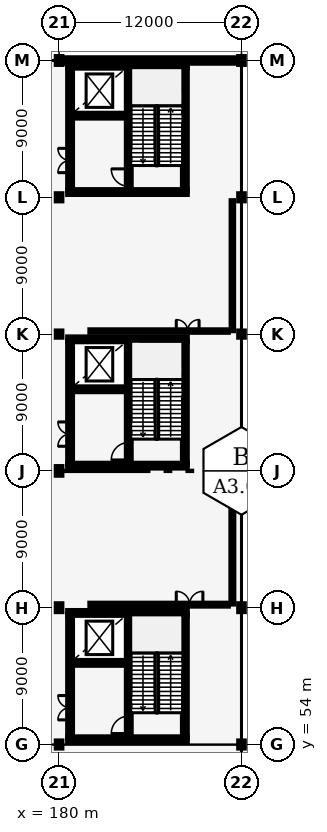
"""IFC4 building model, lengths in metres.
Left out: names, types, materials, properties, quantities, classifications, styles, units other than length and angle.
Written with IfcOpenShell. Run it as: python <this file> out.ifc"""

import sys

from ifc_helpers import new_model, si_unit, direction, frame, frame_2d, origin, origin_2d, place, context, subcontext, project, spatial, rectangle, i_section, extrude, element, fill, save


model = new_model("IFC4")
c1 = context("Model", 3, precision=1e-05, world=origin(), true_north=direction((0.0, 1.0)))
c2 = subcontext(c1, "Body", "Model", "MODEL_VIEW")
j1 = project(units=[si_unit("LENGTHUNIT", "METRE"), si_unit("PLANEANGLEUNIT", "RADIAN")], contexts=[c1])
p1 = place(None, origin())
s1 = spatial("IfcSite", under=j1, at=p1, CompositionType="ELEMENT")
p2 = place(p1, origin())
s2 = spatial("IfcBuilding", under=s1, at=p2, CompositionType="ELEMENT")
p3 = place(p2, frame((0.0, 0.0, 18.0)))
s3 = spatial("IfcBuildingStorey", under=s2, at=p3, CompositionType="ELEMENT", Elevation=18.0)
p4 = place(p3, frame((180.0, 54.0, 0.0), z_axis=(0.0, 0.0, 1.0), x_axis=(1.0, 0.0, 0.0)))
e1 = element("IfcColumn", 1, at=p4, inside=s3, PredefinedType="COLUMN", context=c2, shape_type="SweptSolid", body=[
    extrude(i_section(OverallWidth=0.3, OverallDepth=0.4, WebThickness=0.013, FlangeThickness=0.024, FilletRadius=0.027, at=origin_2d()), origin(), (0.0, 0.0, 1.0), 4.8),
])
p5 = place(p3, frame((180.0, 63.0, 0.0), z_axis=(0.0, 0.0, 1.0), x_axis=(1.0, 0.0, 0.0)))
e2 = element("IfcColumn", 2, at=p5, inside=s3, PredefinedType="COLUMN", context=c2, shape_type="SweptSolid", body=[
    extrude(i_section(OverallWidth=0.3, OverallDepth=0.45, WebThickness=0.014, FlangeThickness=0.026, FilletRadius=0.027, at=origin_2d()), origin(), (0.0, 0.0, 1.0), 4.8),
])
p6 = place(p3, frame((180.0, 72.0, 0.0), z_axis=(0.0, 0.0, 1.0), x_axis=(1.0, 0.0, 0.0)))
e3 = element("IfcColumn", 3, at=p6, inside=s3, PredefinedType="COLUMN", context=c2, shape_type="SweptSolid", body=[
    extrude(i_section(OverallWidth=0.3, OverallDepth=0.5, WebThickness=0.014, FlangeThickness=0.028, FilletRadius=0.027, at=origin_2d()), origin(), (0.0, 0.0, 1.0), 4.8),
])
p7 = place(p3, frame((180.0, 81.0, 0.0), z_axis=(0.0, 0.0, 1.0), x_axis=(1.0, 0.0, 0.0)))
e4 = element("IfcColumn", 4, at=p7, inside=s3, PredefinedType="COLUMN", context=c2, shape_type="SweptSolid", body=[
    extrude(i_section(OverallWidth=0.3, OverallDepth=0.34, WebThickness=0.012, FlangeThickness=0.021, FilletRadius=0.027, at=origin_2d()), origin(), (0.0, 0.0, 1.0), 4.8),
])
p8 = place(p3, frame((180.0, 90.0, 0.0), z_axis=(0.0, 0.0, 1.0), x_axis=(1.0, 0.0, 0.0)))
e5 = element("IfcColumn", 5, at=p8, inside=s3, PredefinedType="COLUMN", context=c2, shape_type="SweptSolid", body=[
    extrude(i_section(OverallWidth=0.3, OverallDepth=0.4, WebThickness=0.013, FlangeThickness=0.024, FilletRadius=0.027, at=origin_2d()), origin(), (0.0, 0.0, 1.0), 4.8),
])
p9 = place(p3, frame((180.0, 99.0, 0.0), z_axis=(0.0, 0.0, 1.0), x_axis=(1.0, 0.0, 0.0)))
e6 = element("IfcColumn", 6, at=p9, inside=s3, PredefinedType="COLUMN", context=c2, shape_type="SweptSolid", body=[
    extrude(i_section(OverallWidth=0.3, OverallDepth=0.45, WebThickness=0.014, FlangeThickness=0.026, FilletRadius=0.027, at=origin_2d()), origin(), (0.0, 0.0, 1.0), 4.8),
])
p10 = place(p3, frame((192.0, 54.0, 0.0), z_axis=(0.0, 0.0, 1.0), x_axis=(1.0, 0.0, 0.0)))
e7 = element("IfcColumn", 7, at=p10, inside=s3, PredefinedType="COLUMN", context=c2, shape_type="SweptSolid", body=[
    extrude(i_section(OverallWidth=0.3, OverallDepth=0.4, WebThickness=0.013, FlangeThickness=0.024, FilletRadius=0.027, at=origin_2d()), origin(), (0.0, 0.0, 1.0), 4.8),
])
p11 = place(p3, frame((192.0, 63.0, 0.0), z_axis=(0.0, 0.0, 1.0), x_axis=(1.0, 0.0, 0.0)))
e8 = element("IfcColumn", 8, at=p11, inside=s3, PredefinedType="COLUMN", context=c2, shape_type="SweptSolid", body=[
    extrude(i_section(OverallWidth=0.3, OverallDepth=0.45, WebThickness=0.014, FlangeThickness=0.026, FilletRadius=0.027, at=origin_2d()), origin(), (0.0, 0.0, 1.0), 4.8),
])
p12 = place(p3, frame((192.0, 72.0, 0.0), z_axis=(0.0, 0.0, 1.0), x_axis=(1.0, 0.0, 0.0)))
e9 = element("IfcColumn", 9, at=p12, inside=s3, PredefinedType="COLUMN", context=c2, shape_type="SweptSolid", body=[
    extrude(i_section(OverallWidth=0.3, OverallDepth=0.5, WebThickness=0.014, FlangeThickness=0.028, FilletRadius=0.027, at=origin_2d()), origin(), (0.0, 0.0, 1.0), 4.8),
])
p13 = place(p3, frame((192.0, 81.0, 0.0), z_axis=(0.0, 0.0, 1.0), x_axis=(1.0, 0.0, 0.0)))
e10 = element("IfcColumn", 10, at=p13, inside=s3, PredefinedType="COLUMN", context=c2, shape_type="SweptSolid", body=[
    extrude(i_section(OverallWidth=0.3, OverallDepth=0.34, WebThickness=0.012, FlangeThickness=0.021, FilletRadius=0.027, at=origin_2d()), origin(), (0.0, 0.0, 1.0), 4.8),
])
p14 = place(p3, frame((192.0, 90.0, 0.0), z_axis=(0.0, 0.0, 1.0), x_axis=(1.0, 0.0, 0.0)))
e11 = element("IfcColumn", 11, at=p14, inside=s3, PredefinedType="COLUMN", context=c2, shape_type="SweptSolid", body=[
    extrude(i_section(OverallWidth=0.3, OverallDepth=0.4, WebThickness=0.013, FlangeThickness=0.024, FilletRadius=0.027, at=origin_2d()), origin(), (0.0, 0.0, 1.0), 4.8),
])
p15 = place(p3, frame((192.0, 99.0, 0.0), z_axis=(0.0, 0.0, 1.0), x_axis=(1.0, 0.0, 0.0)))
e12 = element("IfcColumn", 12, at=p15, inside=s3, PredefinedType="COLUMN", context=c2, shape_type="SweptSolid", body=[
    extrude(i_section(OverallWidth=0.3, OverallDepth=0.45, WebThickness=0.014, FlangeThickness=0.026, FilletRadius=0.027, at=origin_2d()), origin(), (0.0, 0.0, 1.0), 4.8),
])
p16 = place(p3, frame((180.145, 99.0, 0.0), z_axis=(0.0, 0.0, 1.0), x_axis=(1.0, 0.0, 0.0)))
e13 = element("IfcWall", 13, at=p16, inside=s3, PredefinedType="SOLIDWALL", context=c2, shape_type="SweptSolid", body=[
    extrude(rectangle(XDim=11.71, YDim=0.29, at=frame_2d((5.855, 0.0))), origin(), (0.0, 0.0, 1.0), 3.65),
])
p17 = place(p3, frame((180.725, 54.47, 0.0), z_axis=(0.0, 0.0, 1.0), x_axis=(0.0, 1.0, 0.0)))
e14 = element("IfcWall", 14, at=p17, inside=s3, PredefinedType="SHEAR", context=c2, shape_type="SweptSolid", body=[
    extrude(rectangle(XDim=8.06, YDim=0.25, at=frame_2d((4.03, 0.0))), origin(), (0.0, 0.0, 1.0), 4.44),
])
p18 = place(p17, frame((1.15, 0.0, 0.0)))
e15 = element("IfcOpeningElement", 15, at=p18, cuts=e14, PredefinedType="OPENING", context=c2, shape_type="SweptSolid", body=[
    extrude(rectangle(XDim=1.6, YDim=2.2, at=frame_2d((0.8, 1.1))), frame((0.0, 0.135, 0.0), z_axis=(0.0, -1.0, 0.0), x_axis=(1.0, 0.0, 0.0)), (0.0, 0.0, 1.0), 0.27),
])
p19 = place(p3, frame((188.275, 54.47, 0.0), z_axis=(0.0, 0.0, 1.0), x_axis=(0.0, 1.0, 0.0)))
e16 = element("IfcWall", 16, at=p19, inside=s3, PredefinedType="SHEAR", context=c2, shape_type="SweptSolid", body=[
    extrude(rectangle(XDim=8.06, YDim=0.25, at=frame_2d((4.03, 0.0))), origin(), (0.0, 0.0, 1.0), 4.44),
])
for number, where, z_axis, x_axis in (
    (17, (180.6, 54.345, 0.0), (0.0, 0.0, 1.0), (1.0, 0.0, 0.0)),
    (18, (180.6, 62.655, 0.0), (0.0, 0.0, 1.0), (1.0, 0.0, 0.0)),
):
    element("IfcWall", number, at=place(p3, frame(where, z_axis=z_axis, x_axis=x_axis)), inside=s3, PredefinedType="SHEAR", context=c2, shape_type="SweptSolid", body=[
        extrude(rectangle(XDim=7.8, YDim=0.25, at=frame_2d((3.9, 0.0))), origin(), (0.0, 0.0, 1.0), 4.44),
    ])
p20 = place(p3, frame((184.585, 54.47, 0.0), z_axis=(0.0, 0.0, 1.0), x_axis=(0.0, 1.0, 0.0)))
e19 = element("IfcWall", 19, at=p20, inside=s3, PredefinedType="SHEAR", context=c2, shape_type="SweptSolid", body=[
    extrude(rectangle(XDim=8.06, YDim=0.25, at=frame_2d((4.03, 0.0))), origin(), (0.0, 0.0, 1.0), 4.44),
])
p21 = place(p20, frame((0.25, 0.0, 0.0)))
e20 = element("IfcOpeningElement", 20, at=p21, cuts=e19, PredefinedType="OPENING", context=c2, shape_type="SweptSolid", body=[
    extrude(rectangle(XDim=1.15, YDim=2.15, at=frame_2d((0.575, 1.075))), frame((0.0, 0.135, 0.0), z_axis=(0.0, -1.0, 0.0), x_axis=(1.0, 0.0, 0.0)), (0.0, 0.0, 1.0), 0.27),
])
p22 = place(p3, frame((180.85, 59.37, 0.0), z_axis=(0.0, 0.0, 1.0), x_axis=(1.0, 0.0, 0.0)))
e21 = element("IfcWall", 21, at=p22, inside=s3, PredefinedType="SHEAR", context=c2, shape_type="SweptSolid", body=[
    extrude(rectangle(XDim=3.61, YDim=0.25, at=frame_2d((1.805, 0.0))), origin(), (0.0, 0.0, 1.0), 4.44),
])
p23 = place(p22, frame((0.95, 0.0, 0.0)))
e22 = element("IfcOpeningElement", 22, at=p23, cuts=e21, PredefinedType="OPENING", context=c2, shape_type="SweptSolid", body=[
    extrude(rectangle(XDim=1.2, YDim=2.2, at=frame_2d((0.6, 1.1))), frame((0.0, 0.135, 0.0), z_axis=(0.0, -1.0, 0.0), x_axis=(1.0, 0.0, 0.0)), (0.0, 0.0, 1.0), 0.27),
])
p24 = place(p3, frame((180.725, 72.47, 0.0), z_axis=(0.0, 0.0, 1.0), x_axis=(0.0, 1.0, 0.0)))
e23 = element("IfcWall", 23, at=p24, inside=s3, PredefinedType="SHEAR", context=c2, shape_type="SweptSolid", body=[
    extrude(rectangle(XDim=8.06, YDim=0.25, at=frame_2d((4.03, 0.0))), origin(), (0.0, 0.0, 1.0), 4.44),
])
p25 = place(p24, frame((1.15, 0.0, 0.0)))
e24 = element("IfcOpeningElement", 24, at=p25, cuts=e23, PredefinedType="OPENING", context=c2, shape_type="SweptSolid", body=[
    extrude(rectangle(XDim=1.6, YDim=2.2, at=frame_2d((0.8, 1.1))), frame((0.0, 0.135, 0.0), z_axis=(0.0, -1.0, 0.0), x_axis=(1.0, 0.0, 0.0)), (0.0, 0.0, 1.0), 0.27),
])
p26 = place(p3, frame((188.275, 72.47, 0.0), z_axis=(0.0, 0.0, 1.0), x_axis=(0.0, 1.0, 0.0)))
e25 = element("IfcWall", 25, at=p26, inside=s3, PredefinedType="SHEAR", context=c2, shape_type="SweptSolid", body=[
    extrude(rectangle(XDim=8.06, YDim=0.25, at=frame_2d((4.03, 0.0))), origin(), (0.0, 0.0, 1.0), 4.44),
])
for number, where, z_axis, x_axis in (
    (26, (180.6, 72.345, 0.0), (0.0, 0.0, 1.0), (1.0, 0.0, 0.0)),
    (27, (180.6, 80.655, 0.0), (0.0, 0.0, 1.0), (1.0, 0.0, 0.0)),
):
    element("IfcWall", number, at=place(p3, frame(where, z_axis=z_axis, x_axis=x_axis)), inside=s3, PredefinedType="SHEAR", context=c2, shape_type="SweptSolid", body=[
        extrude(rectangle(XDim=7.8, YDim=0.25, at=frame_2d((3.9, 0.0))), origin(), (0.0, 0.0, 1.0), 4.44),
    ])
p27 = place(p3, frame((184.585, 72.47, 0.0), z_axis=(0.0, 0.0, 1.0), x_axis=(0.0, 1.0, 0.0)))
e28 = element("IfcWall", 28, at=p27, inside=s3, PredefinedType="SHEAR", context=c2, shape_type="SweptSolid", body=[
    extrude(rectangle(XDim=8.06, YDim=0.25, at=frame_2d((4.03, 0.0))), origin(), (0.0, 0.0, 1.0), 4.44),
])
p28 = place(p27, frame((0.25, 0.0, 0.0)))
e29 = element("IfcOpeningElement", 29, at=p28, cuts=e28, PredefinedType="OPENING", context=c2, shape_type="SweptSolid", body=[
    extrude(rectangle(XDim=1.15, YDim=2.15, at=frame_2d((0.575, 1.075))), frame((0.0, 0.135, 0.0), z_axis=(0.0, -1.0, 0.0), x_axis=(1.0, 0.0, 0.0)), (0.0, 0.0, 1.0), 0.27),
])
p29 = place(p3, frame((180.85, 77.37, 0.0), z_axis=(0.0, 0.0, 1.0), x_axis=(1.0, 0.0, 0.0)))
e30 = element("IfcWall", 30, at=p29, inside=s3, PredefinedType="SHEAR", context=c2, shape_type="SweptSolid", body=[
    extrude(rectangle(XDim=3.61, YDim=0.25, at=frame_2d((1.805, 0.0))), origin(), (0.0, 0.0, 1.0), 4.44),
])
p30 = place(p29, frame((0.95, 0.0, 0.0)))
e31 = element("IfcOpeningElement", 31, at=p30, cuts=e30, PredefinedType="OPENING", context=c2, shape_type="SweptSolid", body=[
    extrude(rectangle(XDim=1.2, YDim=2.2, at=frame_2d((0.6, 1.1))), frame((0.0, 0.135, 0.0), z_axis=(0.0, -1.0, 0.0), x_axis=(1.0, 0.0, 0.0)), (0.0, 0.0, 1.0), 0.27),
])
p31 = place(p3, frame((180.725, 90.47, 0.0), z_axis=(0.0, 0.0, 1.0), x_axis=(0.0, 1.0, 0.0)))
e32 = element("IfcWall", 32, at=p31, inside=s3, PredefinedType="SHEAR", context=c2, shape_type="SweptSolid", body=[
    extrude(rectangle(XDim=8.06, YDim=0.25, at=frame_2d((4.03, 0.0))), origin(), (0.0, 0.0, 1.0), 4.44),
])
p32 = place(p31, frame((1.15, 0.0, 0.0)))
e33 = element("IfcOpeningElement", 33, at=p32, cuts=e32, PredefinedType="OPENING", context=c2, shape_type="SweptSolid", body=[
    extrude(rectangle(XDim=1.6, YDim=2.2, at=frame_2d((0.8, 1.1))), frame((0.0, 0.135, 0.0), z_axis=(0.0, -1.0, 0.0), x_axis=(1.0, 0.0, 0.0)), (0.0, 0.0, 1.0), 0.27),
])
p33 = place(p3, frame((188.275, 90.47, 0.0), z_axis=(0.0, 0.0, 1.0), x_axis=(0.0, 1.0, 0.0)))
e34 = element("IfcWall", 34, at=p33, inside=s3, PredefinedType="SHEAR", context=c2, shape_type="SweptSolid", body=[
    extrude(rectangle(XDim=8.06, YDim=0.25, at=frame_2d((4.03, 0.0))), origin(), (0.0, 0.0, 1.0), 4.44),
])
for number, where, z_axis, x_axis in (
    (35, (180.6, 90.345, 0.0), (0.0, 0.0, 1.0), (1.0, 0.0, 0.0)),
    (36, (180.6, 98.655, 0.0), (0.0, 0.0, 1.0), (1.0, 0.0, 0.0)),
):
    element("IfcWall", number, at=place(p3, frame(where, z_axis=z_axis, x_axis=x_axis)), inside=s3, PredefinedType="SHEAR", context=c2, shape_type="SweptSolid", body=[
        extrude(rectangle(XDim=7.8, YDim=0.25, at=frame_2d((3.9, 0.0))), origin(), (0.0, 0.0, 1.0), 4.44),
    ])
p34 = place(p3, frame((184.585, 90.47, 0.0), z_axis=(0.0, 0.0, 1.0), x_axis=(0.0, 1.0, 0.0)))
e37 = element("IfcWall", 37, at=p34, inside=s3, PredefinedType="SHEAR", context=c2, shape_type="SweptSolid", body=[
    extrude(rectangle(XDim=8.06, YDim=0.25, at=frame_2d((4.03, 0.0))), origin(), (0.0, 0.0, 1.0), 4.44),
])
p35 = place(p34, frame((0.25, 0.0, 0.0)))
e38 = element("IfcOpeningElement", 38, at=p35, cuts=e37, PredefinedType="OPENING", context=c2, shape_type="SweptSolid", body=[
    extrude(rectangle(XDim=1.15, YDim=2.15, at=frame_2d((0.575, 1.075))), frame((0.0, 0.135, 0.0), z_axis=(0.0, -1.0, 0.0), x_axis=(1.0, 0.0, 0.0)), (0.0, 0.0, 1.0), 0.27),
])
p36 = place(p3, frame((180.85, 95.37, 0.0), z_axis=(0.0, 0.0, 1.0), x_axis=(1.0, 0.0, 0.0)))
e39 = element("IfcWall", 39, at=p36, inside=s3, PredefinedType="SHEAR", context=c2, shape_type="SweptSolid", body=[
    extrude(rectangle(XDim=3.61, YDim=0.25, at=frame_2d((1.805, 0.0))), origin(), (0.0, 0.0, 1.0), 4.44),
])
p37 = place(p36, frame((0.95, 0.0, 0.0)))
e40 = element("IfcOpeningElement", 40, at=p37, cuts=e39, PredefinedType="OPENING", context=c2, shape_type="SweptSolid", body=[
    extrude(rectangle(XDim=1.2, YDim=2.2, at=frame_2d((0.6, 1.1))), frame((0.0, 0.135, 0.0), z_axis=(0.0, -1.0, 0.0), x_axis=(1.0, 0.0, 0.0)), (0.0, 0.0, 1.0), 0.27),
])
p38 = place(p3, frame((182.06, 63.2, 0.0), z_axis=(0.0, 0.0, 1.0), x_axis=(1.0, 0.0, 0.0)))
e41 = element("IfcWall", 41, at=p38, inside=s3, PredefinedType="PARTITIONING", context=c2, shape_type="SweptSolid", body=[
    extrude(rectangle(XDim=9.04, YDim=0.125, at=frame_2d((4.52, 0.0))), origin(), (0.0, 0.0, 1.0), 3.6),
])
p39 = place(p38, frame((5.65, 0.0, 0.0)))
e42 = element("IfcOpeningElement", 42, at=p39, cuts=e41, PredefinedType="OPENING", context=c2, shape_type="SweptSolid", body=[
    extrude(rectangle(XDim=1.75, YDim=2.3, at=frame_2d((0.875, 1.15))), frame((0.0, 0.073, 0.0), z_axis=(0.0, -1.0, 0.0), x_axis=(1.0, 0.0, 0.0)), (0.0, 0.0, 1.0), 0.145),
])
p40 = place(p3, frame((191.4, 63.275, 0.0), z_axis=(0.0, 0.0, 1.0), x_axis=(0.0, 1.0, 0.0)))
e43 = element("IfcWall", 43, at=p40, inside=s3, PredefinedType="PARTITIONING", context=c2, shape_type="SweptSolid", body=[
    extrude(rectangle(XDim=8.45, YDim=0.125, at=frame_2d((4.225, 0.0))), origin(), (0.0, 0.0, 1.0), 3.6),
])
p41 = place(p3, frame((182.06, 81.2, 0.0), z_axis=(0.0, 0.0, 1.0), x_axis=(1.0, 0.0, 0.0)))
e44 = element("IfcWall", 44, at=p41, inside=s3, PredefinedType="PARTITIONING", context=c2, shape_type="SweptSolid", body=[
    extrude(rectangle(XDim=9.04, YDim=0.095, at=frame_2d((4.52, 0.0))), origin(), (0.0, 0.0, 1.0), 3.6),
])
p42 = place(p41, frame((5.65, 0.0, 0.0)))
e45 = element("IfcOpeningElement", 45, at=p42, cuts=e44, PredefinedType="OPENING", context=c2, shape_type="SweptSolid", body=[
    extrude(rectangle(XDim=1.5, YDim=2.25, at=frame_2d((0.75, 1.125))), frame((0.0, 0.057, 0.0), z_axis=(0.0, -1.0, 0.0), x_axis=(1.0, 0.0, 0.0)), (0.0, 0.0, 1.0), 0.115),
])
p43 = place(p3, frame((191.4, 81.257, 0.0), z_axis=(0.0, 0.0, 1.0), x_axis=(0.0, 1.0, 0.0)))
e46 = element("IfcWall", 46, at=p43, inside=s3, PredefinedType="PARTITIONING", context=c2, shape_type="SweptSolid", body=[
    extrude(rectangle(XDim=8.486, YDim=0.095, at=frame_2d((4.243, 0.0))), origin(), (0.0, 0.0, 1.0), 3.6),
])
p44 = place(p21, origin())
e47 = element("IfcDoor", 47, at=p44, inside=s3, OperationType="SINGLE_SWING_LEFT", PredefinedType="DOOR", context=c2, shape_type="SweptSolid", body=[
    extrude(rectangle(XDim=1.15, YDim=2.15, at=frame_2d((0.575, 1.075))), frame((0.0, 0.025, 0.0), z_axis=(0.0, -1.0, 0.0), x_axis=(1.0, 0.0, 0.0)), (0.0, 0.0, 1.0), 0.05),
])
fill(e20, e47)
p45 = place(p23, origin())
e48 = element("IfcDoor", 48, at=p45, inside=s3, OperationType="DOUBLE_DOOR_SLIDING", PredefinedType="DOOR", context=c2, shape_type="SweptSolid", body=[
    extrude(rectangle(XDim=1.2, YDim=2.2, at=frame_2d((0.6, 1.1))), frame((0.0, 0.025, 0.0), z_axis=(0.0, -1.0, 0.0), x_axis=(1.0, 0.0, 0.0)), (0.0, 0.0, 1.0), 0.05),
])
fill(e22, e48)
p46 = place(p18, origin())
e49 = element("IfcDoor", 49, at=p46, inside=s3, OperationType="DOUBLE_DOOR_SINGLE_SWING", PredefinedType="DOOR", context=c2, shape_type="SweptSolid", body=[
    extrude(rectangle(XDim=1.6, YDim=2.2, at=frame_2d((0.8, 1.1))), frame((0.0, 0.025, 0.0), z_axis=(0.0, -1.0, 0.0), x_axis=(1.0, 0.0, 0.0)), (0.0, 0.0, 1.0), 0.05),
])
fill(e15, e49)
p47 = place(p28, origin())
e50 = element("IfcDoor", 50, at=p47, inside=s3, OperationType="SINGLE_SWING_LEFT", PredefinedType="DOOR", context=c2, shape_type="SweptSolid", body=[
    extrude(rectangle(XDim=1.15, YDim=2.15, at=frame_2d((0.575, 1.075))), frame((0.0, 0.025, 0.0), z_axis=(0.0, -1.0, 0.0), x_axis=(1.0, 0.0, 0.0)), (0.0, 0.0, 1.0), 0.05),
])
fill(e29, e50)
p48 = place(p30, origin())
e51 = element("IfcDoor", 51, at=p48, inside=s3, OperationType="DOUBLE_DOOR_SLIDING", PredefinedType="DOOR", context=c2, shape_type="SweptSolid", body=[
    extrude(rectangle(XDim=1.2, YDim=2.2, at=frame_2d((0.6, 1.1))), frame((0.0, 0.025, 0.0), z_axis=(0.0, -1.0, 0.0), x_axis=(1.0, 0.0, 0.0)), (0.0, 0.0, 1.0), 0.05),
])
fill(e31, e51)
p49 = place(p25, origin())
e52 = element("IfcDoor", 52, at=p49, inside=s3, OperationType="DOUBLE_DOOR_SINGLE_SWING", PredefinedType="DOOR", context=c2, shape_type="SweptSolid", body=[
    extrude(rectangle(XDim=1.6, YDim=2.2, at=frame_2d((0.8, 1.1))), frame((0.0, 0.025, 0.0), z_axis=(0.0, -1.0, 0.0), x_axis=(1.0, 0.0, 0.0)), (0.0, 0.0, 1.0), 0.05),
])
fill(e24, e52)
p50 = place(p35, origin())
e53 = element("IfcDoor", 53, at=p50, inside=s3, OperationType="SINGLE_SWING_RIGHT", PredefinedType="DOOR", context=c2, shape_type="SweptSolid", body=[
    extrude(rectangle(XDim=1.15, YDim=2.15, at=frame_2d((0.575, 1.075))), frame((0.0, 0.025, 0.0), z_axis=(0.0, -1.0, 0.0), x_axis=(1.0, 0.0, 0.0)), (0.0, 0.0, 1.0), 0.05),
])
fill(e38, e53)
p51 = place(p37, origin())
e54 = element("IfcDoor", 54, at=p51, inside=s3, OperationType="DOUBLE_DOOR_SLIDING", PredefinedType="DOOR", context=c2, shape_type="SweptSolid", body=[
    extrude(rectangle(XDim=1.2, YDim=2.2, at=frame_2d((0.6, 1.1))), frame((0.0, 0.025, 0.0), z_axis=(0.0, -1.0, 0.0), x_axis=(1.0, 0.0, 0.0)), (0.0, 0.0, 1.0), 0.05),
])
fill(e40, e54)
p52 = place(p32, origin())
e55 = element("IfcDoor", 55, at=p52, inside=s3, OperationType="DOUBLE_DOOR_SINGLE_SWING", PredefinedType="DOOR", context=c2, shape_type="SweptSolid", body=[
    extrude(rectangle(XDim=1.6, YDim=2.2, at=frame_2d((0.8, 1.1))), frame((0.0, 0.025, 0.0), z_axis=(0.0, -1.0, 0.0), x_axis=(1.0, 0.0, 0.0)), (0.0, 0.0, 1.0), 0.05),
])
fill(e33, e55)
p53 = place(p39, origin())
e56 = element("IfcDoor", 56, at=p53, inside=s3, OperationType="DOUBLE_DOOR_SINGLE_SWING", PredefinedType="DOOR", context=c2, shape_type="SweptSolid", body=[
    extrude(rectangle(XDim=1.75, YDim=2.3, at=frame_2d((0.875, 1.15))), frame((0.0, 0.025, 0.0), z_axis=(0.0, -1.0, 0.0), x_axis=(1.0, 0.0, 0.0)), (0.0, 0.0, 1.0), 0.05),
])
fill(e42, e56)
p54 = place(p42, origin())
e57 = element("IfcDoor", 57, at=p54, inside=s3, OperationType="DOUBLE_DOOR_SINGLE_SWING", PredefinedType="DOOR", context=c2, shape_type="SweptSolid", body=[
    extrude(rectangle(XDim=1.5, YDim=2.25, at=frame_2d((0.75, 1.125))), frame((0.0, 0.025, 0.0), z_axis=(0.0, -1.0, 0.0), x_axis=(1.0, 0.0, 0.0)), (0.0, 0.0, 1.0), 0.05),
])
fill(e45, e57)
save(model, sys.argv[1])
